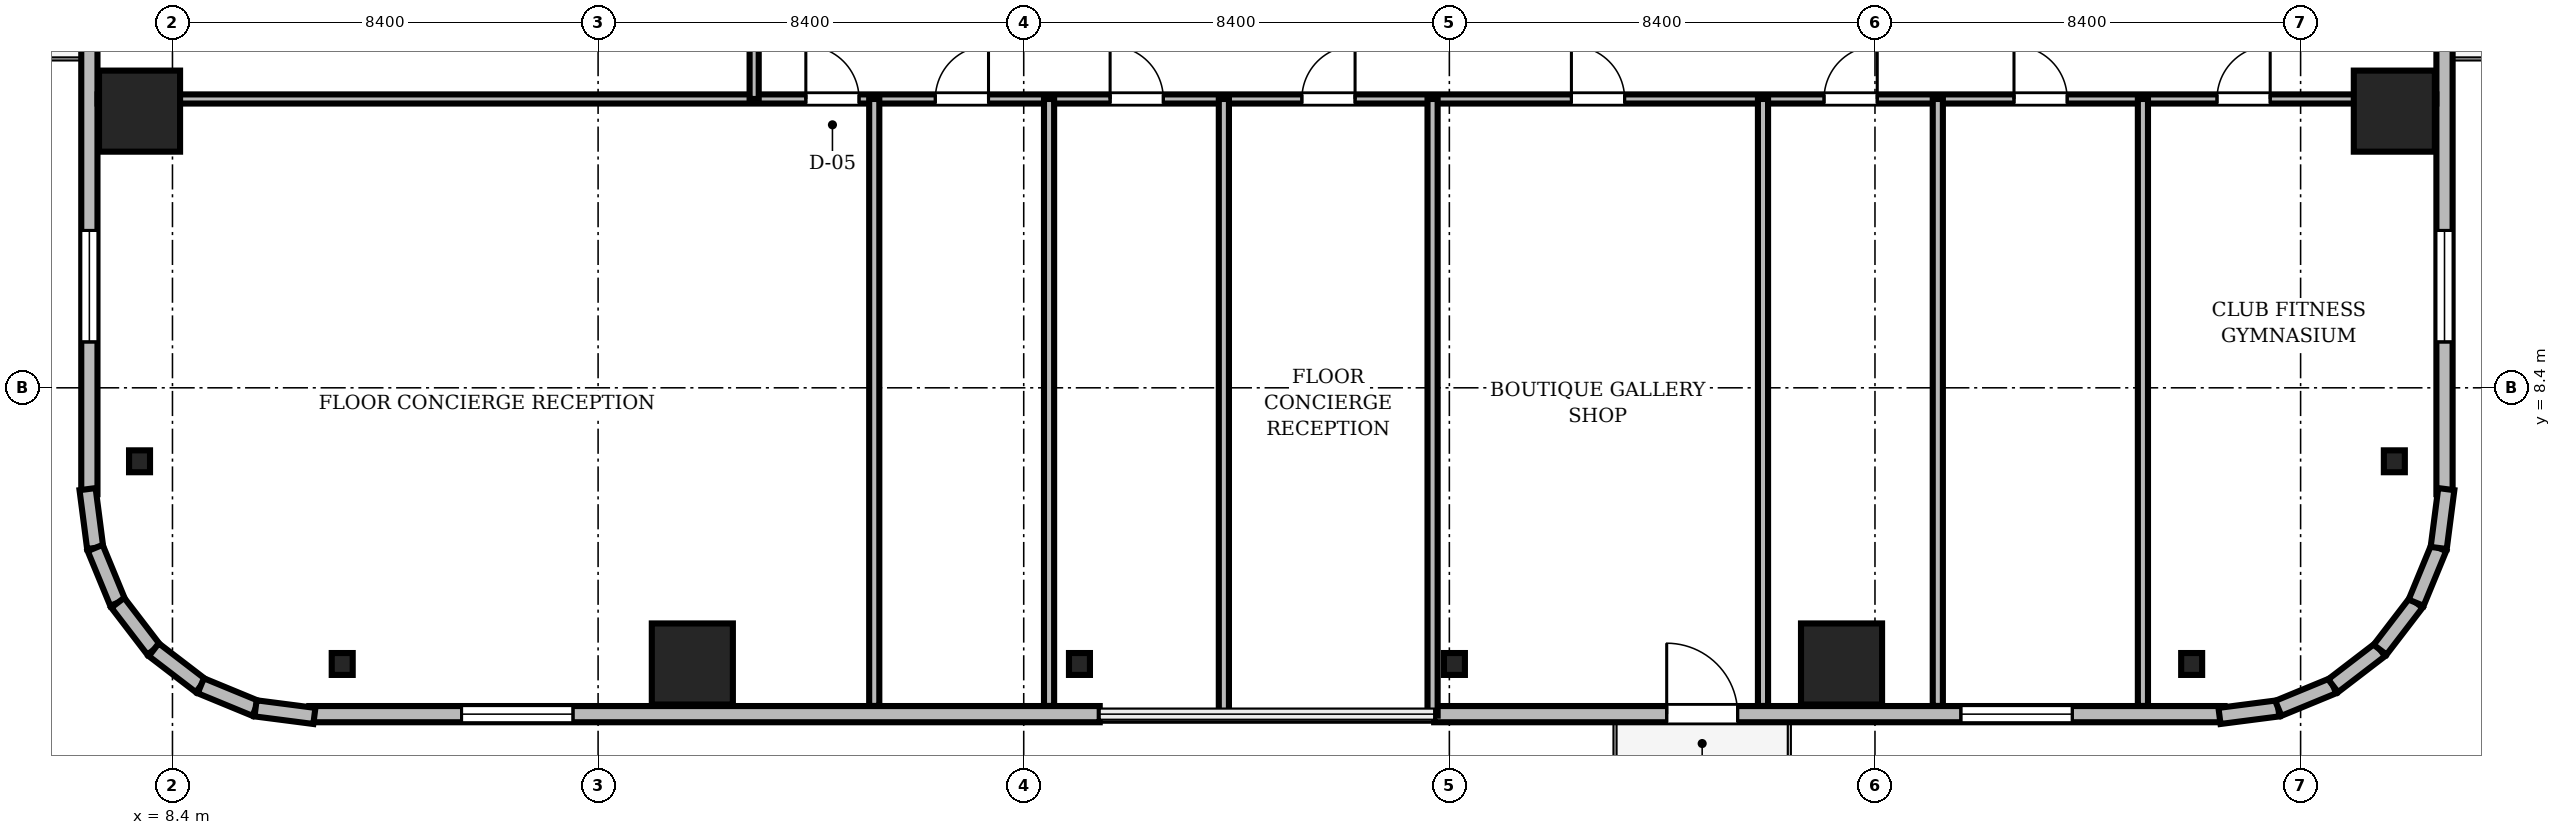
"""IFC4 building model, lengths in metres.
Left out: names, types, materials, properties, quantities, classifications, styles, units other than length and angle.
Written with IfcOpenShell. Run it as: python <this file> out.ifc"""

import sys

from ifc_helpers import new_model, si_unit, direction, frame, frame_2d, origin, origin_2d, place, context, subcontext, project, spatial, rectangle, i_section, extrude, source, transform, mapped, element, fill, save


model = new_model("IFC4")
c1 = context("Model", 3, precision=1e-05, world=origin(), true_north=direction((0.0, 1.0)))
c2 = subcontext(c1, "Body", "Model", "MODEL_VIEW")
j1 = project(units=[si_unit("LENGTHUNIT", "METRE"), si_unit("PLANEANGLEUNIT", "RADIAN")], contexts=[c1])
p1 = place(None, origin())
s1 = spatial("IfcSite", under=j1, at=p1, CompositionType="ELEMENT")
p2 = place(p1, origin())
s2 = spatial("IfcBuilding", under=s1, at=p2, CompositionType="ELEMENT")
p3 = place(p2, frame((0.0, 0.0, 122.4)))
s3 = spatial("IfcBuildingStorey", under=s2, at=p3, CompositionType="ELEMENT", Elevation=122.4)
m1 = source(origin(), c2, "Body", "SweptSolid", [
    extrude(rectangle(XDim=1.6, YDim=1.6, at=origin_2d()), origin(), (0.0, 0.0, 1.0), 3.46),
])
for number, where, z_axis, x_axis in (
    (1, (18.66, 2.95, 0.0), (0.0, 0.0, 1.0), (1.0, 0.0, 0.0)),
    (2, (41.34, 2.95, 0.0), (0.0, 0.0, 1.0), (1.0, 0.0, 0.0)),
    (3, (52.25, 13.86, 0.0), (0.0, 0.0, 1.0), (1.0, 0.0, 0.0)),
    (4, (7.75, 13.86, 0.0), (0.0, 0.0, 1.0), (1.0, 0.0, 0.0)),
):
    element("IfcColumn", number, at=place(p3, frame(where, z_axis=z_axis, x_axis=x_axis)), inside=s3, PredefinedType="COLUMN", context=c2, shape_type="MappedRepresentation", body=[
        mapped(m1, transform((0.0, 0.0, 0.0), scale=1.0)),
    ])
m2 = source(origin(), c2, "Body", "SweptSolid", [
    extrude(i_section(OverallWidth=0.414, OverallDepth=0.432, WebThickness=0.026, FlangeThickness=0.04, FilletRadius=0.015, at=origin_2d()), origin(), (0.0, 0.0, 1.0), 3.46),
])
for number, where, z_axis, x_axis in (
    (5, (11.75, 2.95, 0.0), (0.0, 0.0, 1.0), (1.0, 0.0, 0.0)),
    (6, (26.3, 2.95, 0.0), (0.0, 0.0, 1.0), (1.0, 0.0, 0.0)),
    (7, (33.7, 2.95, 0.0), (0.0, 0.0, 1.0), (1.0, 0.0, 0.0)),
    (8, (48.25, 2.95, 0.0), (0.0, 0.0, 1.0), (1.0, 0.0, 0.0)),
    (9, (52.25, 6.95, 0.0), (0.0, 0.0, 1.0), (1.0, 0.0, 0.0)),
    (10, (7.75, 6.95, 0.0), (0.0, 0.0, 1.0), (1.0, 0.0, 0.0)),
):
    element("IfcColumn", number, at=place(p3, frame(where, z_axis=z_axis, x_axis=x_axis)), inside=s3, PredefinedType="COLUMN", context=c2, shape_type="MappedRepresentation", body=[
        mapped(m2, transform((0.0, 0.0, 0.0), scale=1.0)),
    ])
m3 = source(origin(), c2, "Body", "SweptSolid", [
    extrude(rectangle(XDim=15.6, YDim=0.32, at=frame_2d((7.8, 0.0))), origin(), (0.0, 0.0, 1.0), 3.46),
])
p4 = place(p3, frame((11.1, 1.96, 0.0), z_axis=(0.0, 0.0, 1.0), x_axis=(1.0, 0.0, 0.0)))
e11 = element("IfcWall", 11, at=p4, inside=s3, PredefinedType="SOLIDWALL", context=c2, shape_type="MappedRepresentation", body=[
    mapped(m3, transform((0.0, 0.0, 0.0), scale=1.0)),
])
m4 = source(origin(), c2, "Body", "SweptSolid", [
    extrude(rectangle(XDim=2.2, YDim=2.4, at=frame_2d((1.1, 1.2))), frame((0.0, 0.17, 0.0), z_axis=(0.0, -1.0, 0.0), x_axis=(1.0, 0.0, 0.0)), (0.0, 0.0, 1.0), 0.34),
])
p5 = place(p4, frame((3.005, 0.0, 0.72)))
e12 = element("IfcOpeningElement", 12, at=p5, cuts=e11, PredefinedType="OPENING", context=c2, shape_type="MappedRepresentation", body=[
    mapped(m4, transform((0.0, 0.0, 0.0), scale=1.0)),
])
p6 = place(p3, frame((33.3, 1.96, 0.0), z_axis=(0.0, 0.0, 1.0), x_axis=(1.0, 0.0, 0.0)))
e13 = element("IfcWall", 13, at=p6, inside=s3, PredefinedType="SOLIDWALL", context=c2, shape_type="MappedRepresentation", body=[
    mapped(m3, transform((0.0, 0.0, 0.0), scale=1.0)),
])
m5 = source(origin(), c2, "Body", "SweptSolid", [
    extrude(rectangle(XDim=1.4, YDim=2.3, at=frame_2d((0.7, 1.15))), frame((0.0, 0.17, 0.0), z_axis=(0.0, -1.0, 0.0), x_axis=(1.0, 0.0, 0.0)), (0.0, 0.0, 1.0), 0.34),
])
p7 = place(p6, frame((4.59, 0.0, 0.0)))
e14 = element("IfcOpeningElement", 14, at=p7, cuts=e13, PredefinedType="OPENING", context=c2, shape_type="MappedRepresentation", body=[
    mapped(m5, transform((0.0, 0.0, 0.0), scale=1.0)),
])
p8 = place(p6, frame((10.395, 0.0, 0.72)))
e15 = element("IfcOpeningElement", 15, at=p8, cuts=e13, PredefinedType="OPENING", context=c2, shape_type="MappedRepresentation", body=[
    mapped(m4, transform((0.0, 0.0, 0.0), scale=1.0)),
])
p9 = place(p3, frame((6.76, 21.9, 0.0), z_axis=(0.0, 0.0, 1.0), x_axis=(0.0, -1.0, 0.0)))
e16 = element("IfcWall", 16, at=p9, inside=s3, PredefinedType="SOLIDWALL", context=c2, shape_type="MappedRepresentation", body=[
    mapped(m3, transform((0.0, 0.0, 0.0), scale=1.0)),
])
p10 = place(p9, frame((4.59, 0.0, 0.0)))
e17 = element("IfcOpeningElement", 17, at=p10, cuts=e16, PredefinedType="OPENING", context=c2, shape_type="MappedRepresentation", body=[
    mapped(m5, transform((0.0, 0.0, 0.0), scale=1.0)),
])
p11 = place(p9, frame((10.395, 0.0, 0.72)))
e18 = element("IfcOpeningElement", 18, at=p11, cuts=e16, PredefinedType="OPENING", context=c2, shape_type="MappedRepresentation", body=[
    mapped(m4, transform((0.0, 0.0, 0.0), scale=1.0)),
])
p12 = place(p3, frame((53.24, 6.3, 0.0), z_axis=(0.0, 0.0, 1.0), x_axis=(0.0, 1.0, 0.0)))
e19 = element("IfcWall", 19, at=p12, inside=s3, PredefinedType="SOLIDWALL", context=c2, shape_type="MappedRepresentation", body=[
    mapped(m3, transform((0.0, 0.0, 0.0), scale=1.0)),
])
p13 = place(p12, frame((9.61, 0.0, 0.0)))
e20 = element("IfcOpeningElement", 20, at=p13, cuts=e19, PredefinedType="OPENING", context=c2, shape_type="MappedRepresentation", body=[
    mapped(m5, transform((0.0, 0.0, 0.0), scale=1.0)),
])
p14 = place(p12, frame((3.005, 0.0, 0.72)))
e21 = element("IfcOpeningElement", 21, at=p14, cuts=e19, PredefinedType="OPENING", context=c2, shape_type="MappedRepresentation", body=[
    mapped(m4, transform((0.0, 0.0, 0.0), scale=1.0)),
])
m6 = source(origin(), c2, "Body", "SweptSolid", [
    extrude(rectangle(XDim=1.171, YDim=0.32, at=frame_2d((0.585, 0.0))), origin(), (0.0, 0.0, 1.0), 3.46),
])
p15 = place(p3, frame((6.724, 6.401, 0.0), z_axis=(0.0, 0.0, 1.0), x_axis=(0.128269133229, -0.991739395941, 0.0)))
e22 = element("IfcWall", 22, at=p15, inside=s3, PredefinedType="SOLIDWALL", context=c2, shape_type="MappedRepresentation", body=[
    mapped(m6, transform((0.0, 0.0, 0.0), scale=1.0)),
])
m7 = source(origin(), c2, "Body", "SweptSolid", [
    extrude(rectangle(XDim=1.169, YDim=0.32, at=frame_2d((0.584, 0.0))), origin(), (0.0, 0.0, 1.0), 3.46),
])
for number, where, z_axis, x_axis in (
    (23, (6.875, 5.24, 0.0), (0.0, 0.0, 1.0), (0.381, -0.925, 0.0)),
    (24, (7.32, 4.159, 0.0), (0.0, 0.0, 1.0), (0.608, -0.794, 0.0)),
):
    element("IfcWall", number, at=place(p3, frame(where, z_axis=z_axis, x_axis=x_axis)), inside=s3, PredefinedType="SOLIDWALL", context=c2, shape_type="MappedRepresentation", body=[
        mapped(m7, transform((0.0, 0.0, 0.0), scale=1.0)),
    ])
m8 = source(origin(), c2, "Body", "SweptSolid", [
    extrude(rectangle(XDim=1.169, YDim=0.32, at=frame_2d((0.584, 0.0))), origin(), (0.0, 0.0, 1.0), 3.46),
])
p16 = place(p3, frame((8.031, 3.231, 0.0), z_axis=(0.0, 0.0, 1.0), x_axis=(0.793663520347, -0.608356981114, 0.0)))
e25 = element("IfcWall", 25, at=p16, inside=s3, PredefinedType="SOLIDWALL", context=c2, shape_type="MappedRepresentation", body=[
    mapped(m8, transform((0.0, 0.0, 0.0), scale=1.0)),
])
m9 = source(origin(), c2, "Body", "SweptSolid", [
    extrude(rectangle(XDim=1.169, YDim=0.32, at=frame_2d((0.585, 0.0))), origin(), (0.0, 0.0, 1.0), 3.46),
])
p17 = place(p3, frame((8.959, 2.52, 0.0), z_axis=(0.0, 0.0, 1.0), x_axis=(0.924479075121, -0.381232789334, 0.0)))
e26 = element("IfcWall", 26, at=p17, inside=s3, PredefinedType="SOLIDWALL", context=c2, shape_type="MappedRepresentation", body=[
    mapped(m9, transform((0.0, 0.0, 0.0), scale=1.0)),
])
m10 = source(origin(), c2, "Body", "SweptSolid", [
    extrude(rectangle(XDim=1.17, YDim=0.32, at=frame_2d((0.585, 0.0))), origin(), (0.0, 0.0, 1.0), 3.46),
])
for number, where, z_axis, x_axis in (
    (27, (10.04, 2.074, 0.0), (0.0, 0.0, 1.0), (0.992, -0.128, 0.0)),
    (28, (48.8, 1.925, 0.0), (0.0, 0.0, 1.0), (0.992, 0.128, 0.0)),
):
    element("IfcWall", number, at=place(p3, frame(where, z_axis=z_axis, x_axis=x_axis)), inside=s3, PredefinedType="SOLIDWALL", context=c2, shape_type="MappedRepresentation", body=[
        mapped(m10, transform((0.0, 0.0, 0.0), scale=1.0)),
    ])
p18 = place(p3, frame((49.96, 2.074, 0.0), z_axis=(0.0, 0.0, 1.0), x_axis=(0.924479075121, 0.381232789334, 0.0)))
e29 = element("IfcWall", 29, at=p18, inside=s3, PredefinedType="SOLIDWALL", context=c2, shape_type="MappedRepresentation", body=[
    mapped(m9, transform((0.0, 0.0, 0.0), scale=1.0)),
])
p19 = place(p3, frame((51.041, 2.52, 0.0), z_axis=(0.0, 0.0, 1.0), x_axis=(0.793663520347, 0.608356981114, 0.0)))
e30 = element("IfcWall", 30, at=p19, inside=s3, PredefinedType="SOLIDWALL", context=c2, shape_type="MappedRepresentation", body=[
    mapped(m8, transform((0.0, 0.0, 0.0), scale=1.0)),
])
for number, where, z_axis, x_axis in (
    (31, (51.969, 3.231, 0.0), (0.0, 0.0, 1.0), (0.608, 0.794, 0.0)),
    (32, (52.68, 4.159, 0.0), (0.0, 0.0, 1.0), (0.381, 0.925, 0.0)),
):
    element("IfcWall", number, at=place(p3, frame(where, z_axis=z_axis, x_axis=x_axis)), inside=s3, PredefinedType="SOLIDWALL", context=c2, shape_type="MappedRepresentation", body=[
        mapped(m7, transform((0.0, 0.0, 0.0), scale=1.0)),
    ])
p20 = place(p3, frame((53.125, 5.24, 0.0), z_axis=(0.0, 0.0, 1.0), x_axis=(0.128269133229, 0.991739395941, 0.0)))
e33 = element("IfcWall", 33, at=p20, inside=s3, PredefinedType="SOLIDWALL", context=c2, shape_type="MappedRepresentation", body=[
    mapped(m6, transform((0.0, 0.0, 0.0), scale=1.0)),
])
m11 = source(origin(), c2, "Body", "SweptSolid", [
    extrude(rectangle(XDim=46.156, YDim=0.18, at=frame_2d((23.078, 0.0))), origin(), (0.0, 0.0, 1.0), 2.702),
])
p21 = place(p3, frame((6.922, 14.1, 0.0), z_axis=(0.0, 0.0, 1.0), x_axis=(1.0, 0.0, 0.0)))
e34 = element("IfcWall", 34, at=p21, inside=s3, PredefinedType="PARTITIONING", context=c2, shape_type="MappedRepresentation", body=[
    mapped(m11, transform((0.0, 0.0, 0.0), scale=1.0)),
])
m12 = source(origin(), c2, "Body", "SweptSolid", [
    extrude(rectangle(XDim=1.05, YDim=2.2, at=frame_2d((0.525, 1.1))), frame((0.0, 0.1, 0.0), z_axis=(0.0, -1.0, 0.0), x_axis=(1.0, 0.0, 0.0)), (0.0, 0.0, 1.0), 0.2),
])
p22 = place(p21, frame((13.978, 0.0, 0.0)))
e35 = element("IfcOpeningElement", 35, at=p22, cuts=e34, PredefinedType="OPENING", context=c2, shape_type="MappedRepresentation", body=[
    mapped(m12, transform((0.0, 0.0, 0.0), scale=1.0)),
])
p23 = place(p21, frame((16.533, 0.0, 0.0)))
e36 = element("IfcOpeningElement", 36, at=p23, cuts=e34, PredefinedType="OPENING", context=c2, shape_type="MappedRepresentation", body=[
    mapped(m12, transform((0.0, 0.0, 0.0), scale=1.0)),
])
p24 = place(p21, frame((19.983, 0.0, 0.0)))
e37 = element("IfcOpeningElement", 37, at=p24, cuts=e34, PredefinedType="OPENING", context=c2, shape_type="MappedRepresentation", body=[
    mapped(m12, transform((0.0, 0.0, 0.0), scale=1.0)),
])
p25 = place(p21, frame((23.767, 0.0, 0.0)))
e38 = element("IfcOpeningElement", 38, at=p25, cuts=e34, PredefinedType="OPENING", context=c2, shape_type="MappedRepresentation", body=[
    mapped(m12, transform((0.0, 0.0, 0.0), scale=1.0)),
])
p26 = place(p21, frame((29.087, 0.0, 0.0)))
e39 = element("IfcOpeningElement", 39, at=p26, cuts=e34, PredefinedType="OPENING", context=c2, shape_type="MappedRepresentation", body=[
    mapped(m12, transform((0.0, 0.0, 0.0), scale=1.0)),
])
p27 = place(p21, frame((34.073, 0.0, 0.0)))
e40 = element("IfcOpeningElement", 40, at=p27, cuts=e34, PredefinedType="OPENING", context=c2, shape_type="MappedRepresentation", body=[
    mapped(m12, transform((0.0, 0.0, 0.0), scale=1.0)),
])
p28 = place(p21, frame((37.822, 0.0, 0.0)))
e41 = element("IfcOpeningElement", 41, at=p28, cuts=e34, PredefinedType="OPENING", context=c2, shape_type="MappedRepresentation", body=[
    mapped(m12, transform((0.0, 0.0, 0.0), scale=1.0)),
])
p29 = place(p21, frame((41.828, 0.0, 0.0)))
e42 = element("IfcOpeningElement", 42, at=p29, cuts=e34, PredefinedType="OPENING", context=c2, shape_type="MappedRepresentation", body=[
    mapped(m12, transform((0.0, 0.0, 0.0), scale=1.0)),
])
m13 = source(origin(), c2, "Body", "SweptSolid", [
    extrude(rectangle(XDim=14.45, YDim=0.18, at=frame_2d((7.225, 0.0))), origin(), (0.0, 0.0, 1.0), 2.852),
])
p30 = place(p3, frame((19.88, 14.1, 0.0), z_axis=(0.0, 0.0, 1.0), x_axis=(0.0, 1.0, 0.0)))
e43 = element("IfcWall", 43, at=p30, inside=s3, PredefinedType="PARTITIONING", context=c2, shape_type="MappedRepresentation", body=[
    mapped(m13, transform((0.0, 0.0, 0.0), scale=1.0)),
])
m14 = source(origin(), c2, "Body", "SweptSolid", [
    extrude(rectangle(XDim=11.978, YDim=0.2, at=frame_2d((5.989, 0.0))), origin(), (0.0, 0.0, 1.0), 2.702),
])
for number, where, z_axis, x_axis in (
    (44, (22.25, 2.122, 0.0), (0.0, 0.0, 1.0), (0.0, 1.0, 0.0)),
    (45, (25.7, 2.122, 0.0), (0.0, 0.0, 1.0), (0.0, 1.0, 0.0)),
):
    element("IfcWall", number, at=place(p3, frame(where, z_axis=z_axis, x_axis=x_axis)), inside=s3, PredefinedType="PARTITIONING", context=c2, shape_type="MappedRepresentation", body=[
        mapped(m14, transform((0.0, 0.0, 0.0), scale=1.0)),
    ])
m15 = source(origin(), c2, "Body", "SweptSolid", [
    extrude(rectangle(XDim=12.17, YDim=0.2, at=frame_2d((6.085, 0.0))), origin(), (0.0, 0.0, 1.0), 2.702),
])
for number, where, z_axis, x_axis in (
    (46, (29.15, 1.93, 0.0), (0.0, 0.0, 1.0), (0.0, 1.0, 0.0)),
    (47, (33.269, 1.93, 0.0), (0.0, 0.0, 1.0), (0.0, 1.0, 0.0)),
):
    element("IfcWall", number, at=place(p3, frame(where, z_axis=z_axis, x_axis=x_axis)), inside=s3, PredefinedType="PARTITIONING", context=c2, shape_type="MappedRepresentation", body=[
        mapped(m15, transform((0.0, 0.0, 0.0), scale=1.0)),
    ])
for number, where, z_axis, x_axis in (
    (48, (39.79, 2.122, 0.0), (0.0, 0.0, 1.0), (0.0, 1.0, 0.0)),
    (49, (43.24, 2.122, 0.0), (0.0, 0.0, 1.0), (0.0, 1.0, 0.0)),
    (50, (47.288, 2.122, 0.0), (0.0, 0.0, 1.0), (0.0, 1.0, 0.0)),
):
    element("IfcWall", number, at=place(p3, frame(where, z_axis=z_axis, x_axis=x_axis)), inside=s3, PredefinedType="PARTITIONING", context=c2, shape_type="MappedRepresentation", body=[
        mapped(m14, transform((0.0, 0.0, 0.0), scale=1.0)),
    ])
m16 = source(origin(), c2, "Body", "SweptSolid", [
    extrude(rectangle(XDim=1.4, YDim=2.3, at=frame_2d((0.7, 1.15))), frame((0.0, 0.025, 0.0), z_axis=(0.0, -1.0, 0.0), x_axis=(1.0, 0.0, 0.0)), (0.0, 0.0, 1.0), 0.05),
])
p31 = place(p7, frame((1.4, 0.0, 0.0), z_axis=(0.0, 0.0, 1.0), x_axis=(-1.0, 0.0, 0.0)))
e51 = element("IfcDoor", 51, at=p31, inside=s3, OperationType="DOUBLE_DOOR_SLIDING", PredefinedType="DOOR", context=c2, shape_type="MappedRepresentation", body=[
    mapped(m16, transform((0.0, 0.0, 0.0), scale=1.0)),
])
fill(e14, e51)
m17 = source(origin(), c2, "Body", "SweptSolid", [
    extrude(rectangle(XDim=2.2, YDim=2.4, at=frame_2d((1.1, 1.2))), frame((0.0, 0.03, 0.0), z_axis=(0.0, -1.0, 0.0), x_axis=(1.0, 0.0, 0.0)), (0.0, 0.0, 1.0), 0.06),
])
p32 = place(p5, origin())
e52 = element("IfcWindow", 52, at=p32, inside=s3, PartitioningType="SINGLE_PANEL", PredefinedType="WINDOW", context=c2, shape_type="MappedRepresentation", body=[
    mapped(m17, transform((0.0, 0.0, 0.0), scale=1.0)),
])
fill(e12, e52)
p33 = place(p8, origin())
e53 = element("IfcWindow", 53, at=p33, inside=s3, PartitioningType="SINGLE_PANEL", PredefinedType="WINDOW", context=c2, shape_type="MappedRepresentation", body=[
    mapped(m17, transform((0.0, 0.0, 0.0), scale=1.0)),
])
fill(e15, e53)
p34 = place(p11, origin())
e54 = element("IfcWindow", 54, at=p34, inside=s3, PartitioningType="SINGLE_PANEL", PredefinedType="WINDOW", context=c2, shape_type="MappedRepresentation", body=[
    mapped(m17, transform((0.0, 0.0, 0.0), scale=1.0)),
])
fill(e18, e54)
p35 = place(p14, origin())
e55 = element("IfcWindow", 55, at=p35, inside=s3, PartitioningType="SINGLE_PANEL", PredefinedType="WINDOW", context=c2, shape_type="MappedRepresentation", body=[
    mapped(m17, transform((0.0, 0.0, 0.0), scale=1.0)),
])
fill(e21, e55)
m18 = source(origin(), c2, "Body", "SweptSolid", [
    extrude(rectangle(XDim=1.05, YDim=2.2, at=frame_2d((0.525, 1.1))), frame((0.0, 0.025, 0.0), z_axis=(0.0, -1.0, 0.0), x_axis=(1.0, 0.0, 0.0)), (0.0, 0.0, 1.0), 0.05),
])
p36 = place(p22, origin())
e56 = element("IfcDoor", 56, at=p36, inside=s3, OperationType="SINGLE_SWING_LEFT", PredefinedType="DOOR", context=c2, shape_type="MappedRepresentation", body=[
    mapped(m18, transform((0.0, 0.0, 0.0), scale=1.0)),
])
fill(e35, e56)
p37 = place(p23, origin())
e57 = element("IfcDoor", 57, at=p37, inside=s3, OperationType="SINGLE_SWING_RIGHT", PredefinedType="DOOR", context=c2, shape_type="MappedRepresentation", body=[
    mapped(m18, transform((0.0, 0.0, 0.0), scale=1.0)),
])
fill(e36, e57)
p38 = place(p24, origin())
e58 = element("IfcDoor", 58, at=p38, inside=s3, OperationType="SINGLE_SWING_LEFT", PredefinedType="DOOR", context=c2, shape_type="MappedRepresentation", body=[
    mapped(m18, transform((0.0, 0.0, 0.0), scale=1.0)),
])
fill(e37, e58)
p39 = place(p25, origin())
e59 = element("IfcDoor", 59, at=p39, inside=s3, OperationType="SINGLE_SWING_RIGHT", PredefinedType="DOOR", context=c2, shape_type="MappedRepresentation", body=[
    mapped(m18, transform((0.0, 0.0, 0.0), scale=1.0)),
])
fill(e38, e59)
p40 = place(p26, origin())
e60 = element("IfcDoor", 60, at=p40, inside=s3, OperationType="SINGLE_SWING_LEFT", PredefinedType="DOOR", context=c2, shape_type="MappedRepresentation", body=[
    mapped(m18, transform((0.0, 0.0, 0.0), scale=1.0)),
])
fill(e39, e60)
p41 = place(p27, origin())
e61 = element("IfcDoor", 61, at=p41, inside=s3, OperationType="SINGLE_SWING_RIGHT", PredefinedType="DOOR", context=c2, shape_type="MappedRepresentation", body=[
    mapped(m18, transform((0.0, 0.0, 0.0), scale=1.0)),
])
fill(e40, e61)
p42 = place(p28, origin())
e62 = element("IfcDoor", 62, at=p42, inside=s3, OperationType="SINGLE_SWING_LEFT", PredefinedType="DOOR", context=c2, shape_type="MappedRepresentation", body=[
    mapped(m18, transform((0.0, 0.0, 0.0), scale=1.0)),
])
fill(e41, e62)
p43 = place(p29, origin())
e63 = element("IfcDoor", 63, at=p43, inside=s3, OperationType="SINGLE_SWING_RIGHT", PredefinedType="DOOR", context=c2, shape_type="MappedRepresentation", body=[
    mapped(m18, transform((0.0, 0.0, 0.0), scale=1.0)),
])
fill(e42, e63)
save(model, sys.argv[1])
